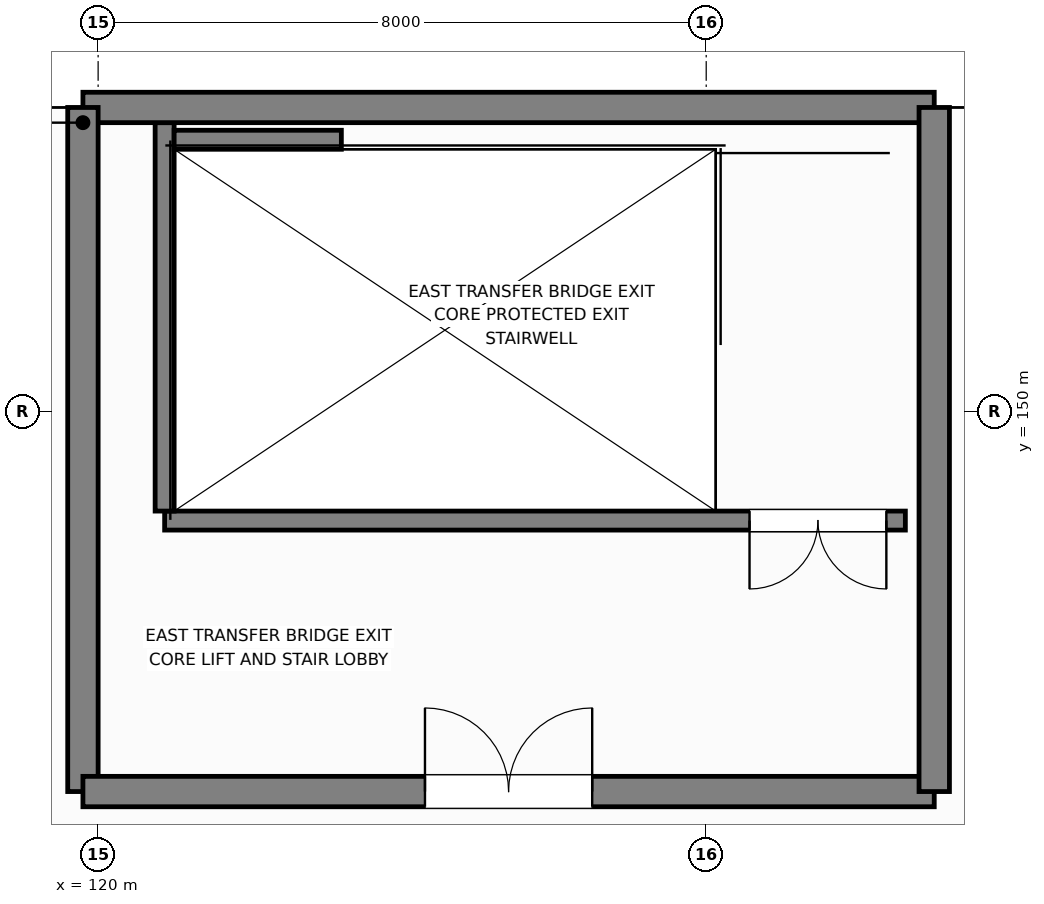
"""IFC4 building model, lengths in metres.
Left out: names, types, materials, properties, quantities, classifications, styles, units other than length and angle.
Written with IfcOpenShell. Run it as: python <this file> out.ifc"""

import sys

from ifc_helpers import new_model, si_unit, direction, frame, frame_2d, origin, place, context, subcontext, project, spatial, rectangle, extrude, element, fill, save


model = new_model("IFC4")
c1 = context("Model", 3, precision=1e-05, world=origin(), true_north=direction((0.0, 1.0)))
c2 = subcontext(c1, "Body", "Model", "MODEL_VIEW")
j1 = project(units=[si_unit("LENGTHUNIT", "METRE"), si_unit("PLANEANGLEUNIT", "RADIAN")], contexts=[c1])
p1 = place(None, origin())
s1 = spatial("IfcSite", under=j1, at=p1, CompositionType="ELEMENT")
p2 = place(p1, origin())
s2 = spatial("IfcBuilding", under=s1, at=p2, CompositionType="ELEMENT")
p3 = place(p2, frame((0.0, 0.0, 6.0)))
s3 = spatial("IfcBuildingStorey", under=s2, at=p3, CompositionType="ELEMENT", Elevation=6.0)
p4 = place(p3, frame((130.62, 148.565, 0.0), z_axis=(0.0, 0.0, 1.0), x_axis=(-1.0, 0.0, 0.0)))
e1 = element("IfcWall", 1, at=p4, inside=s3, PredefinedType="SOLIDWALL", context=c2, shape_type="SweptSolid", body=[
    extrude(rectangle(XDim=9.745, YDim=0.25, at=frame_2d((4.872, 0.0))), origin(), (0.0, 0.0, 1.0), 5.05),
])
p5 = place(p4, frame((0.25, 0.0, 0.0)))
e2 = element("IfcOpeningElement", 2, at=p5, cuts=e1, PredefinedType="OPENING", context=c2, shape_type="SweptSolid", body=[
    extrude(rectangle(XDim=1.8, YDim=2.25, at=frame_2d((0.9, 1.125))), frame((0.0, 0.135, 0.0), z_axis=(0.0, -1.0, 0.0), x_axis=(1.0, 0.0, 0.0)), (0.0, 0.0, 1.0), 0.27),
])
p6 = place(p3, frame((120.875, 153.8, 0.0), z_axis=(0.0, 0.0, 1.0), x_axis=(0.0, -1.0, 0.0)))
e3 = element("IfcWall", 3, at=p6, inside=s3, PredefinedType="SOLIDWALL", context=c2, shape_type="SweptSolid", body=[
    extrude(rectangle(XDim=5.11, YDim=0.25, at=frame_2d((2.555, 0.0))), origin(), (0.0, 0.0, 1.0), 5.05),
])
p7 = place(p3, frame((123.2, 153.575, 0.0), z_axis=(0.0, 0.0, 1.0), x_axis=(-1.0, 0.0, 0.0)))
e4 = element("IfcWall", 4, at=p7, inside=s3, PredefinedType="SOLIDWALL", context=c2, shape_type="SweptSolid", body=[
    extrude(rectangle(XDim=2.2, YDim=0.25, at=frame_2d((1.1, 0.0))), origin(), (0.0, 0.0, 1.0), 5.05),
])
p8 = place(p3, frame((131.0, 154.0, 0.0), z_axis=(0.0, 0.0, 1.0), x_axis=(-1.0, 0.0, 0.0)))
e5 = element("IfcWall", 5, at=p8, inside=s3, PredefinedType="SHEAR", context=c2, shape_type="SweptSolid", body=[
    extrude(rectangle(XDim=11.2, YDim=0.4, at=frame_2d((5.6, 0.0))), origin(), (0.0, 0.0, 1.0), 5.05),
])
p9 = place(p3, frame((119.8, 154.0, 0.0), z_axis=(0.0, 0.0, 1.0), x_axis=(0.0, -1.0, 0.0)))
e6 = element("IfcWall", 6, at=p9, inside=s3, PredefinedType="SHEAR", context=c2, shape_type="SweptSolid", body=[
    extrude(rectangle(XDim=9.0, YDim=0.4, at=frame_2d((4.5, 0.0))), origin(), (0.0, 0.0, 1.0), 5.05),
])
p10 = place(p3, frame((119.8, 145.0, 0.0), z_axis=(0.0, 0.0, 1.0), x_axis=(1.0, 0.0, 0.0)))
e7 = element("IfcWall", 7, at=p10, inside=s3, PredefinedType="SHEAR", context=c2, shape_type="SweptSolid", body=[
    extrude(rectangle(XDim=11.2, YDim=0.4, at=frame_2d((5.6, 0.0))), origin(), (0.0, 0.0, 1.0), 5.05),
])
p11 = place(p10, frame((4.5, 0.0, 0.0)))
e8 = element("IfcOpeningElement", 8, at=p11, cuts=e7, PredefinedType="OPENING", context=c2, shape_type="SweptSolid", body=[
    extrude(rectangle(XDim=2.2, YDim=2.3, at=frame_2d((1.1, 1.15))), frame((0.0, 0.21, 0.0), z_axis=(0.0, -1.0, 0.0), x_axis=(1.0, 0.0, 0.0)), (0.0, 0.0, 1.0), 0.42),
])
p12 = place(p3, frame((131.0, 145.0, 0.0), z_axis=(0.0, 0.0, 1.0), x_axis=(0.0, 1.0, 0.0)))
e9 = element("IfcWall", 9, at=p12, inside=s3, PredefinedType="SHEAR", context=c2, shape_type="SweptSolid", body=[
    extrude(rectangle(XDim=9.0, YDim=0.4, at=frame_2d((4.5, 0.0))), origin(), (0.0, 0.0, 1.0), 5.05),
])
p13 = place(p5, origin())
e10 = element("IfcDoor", 10, at=p13, inside=s3, OperationType="DOUBLE_DOOR_SINGLE_SWING", PredefinedType="DOOR", context=c2, shape_type="SweptSolid", body=[
    extrude(rectangle(XDim=1.8, YDim=2.25, at=frame_2d((0.9, 1.125))), frame((0.0, 0.025, 0.0), z_axis=(0.0, -1.0, 0.0), x_axis=(1.0, 0.0, 0.0)), (0.0, 0.0, 1.0), 0.05),
])
fill(e2, e10)
p14 = place(p11, origin())
e11 = element("IfcDoor", 11, at=p14, inside=s3, OperationType="DOUBLE_DOOR_SINGLE_SWING", PredefinedType="DOOR", context=c2, shape_type="SweptSolid", body=[
    extrude(rectangle(XDim=2.2, YDim=2.3, at=frame_2d((1.1, 1.15))), frame((0.0, 0.025, 0.0), z_axis=(0.0, -1.0, 0.0), x_axis=(1.0, 0.0, 0.0)), (0.0, 0.0, 1.0), 0.05),
])
fill(e8, e11)
save(model, sys.argv[1])
